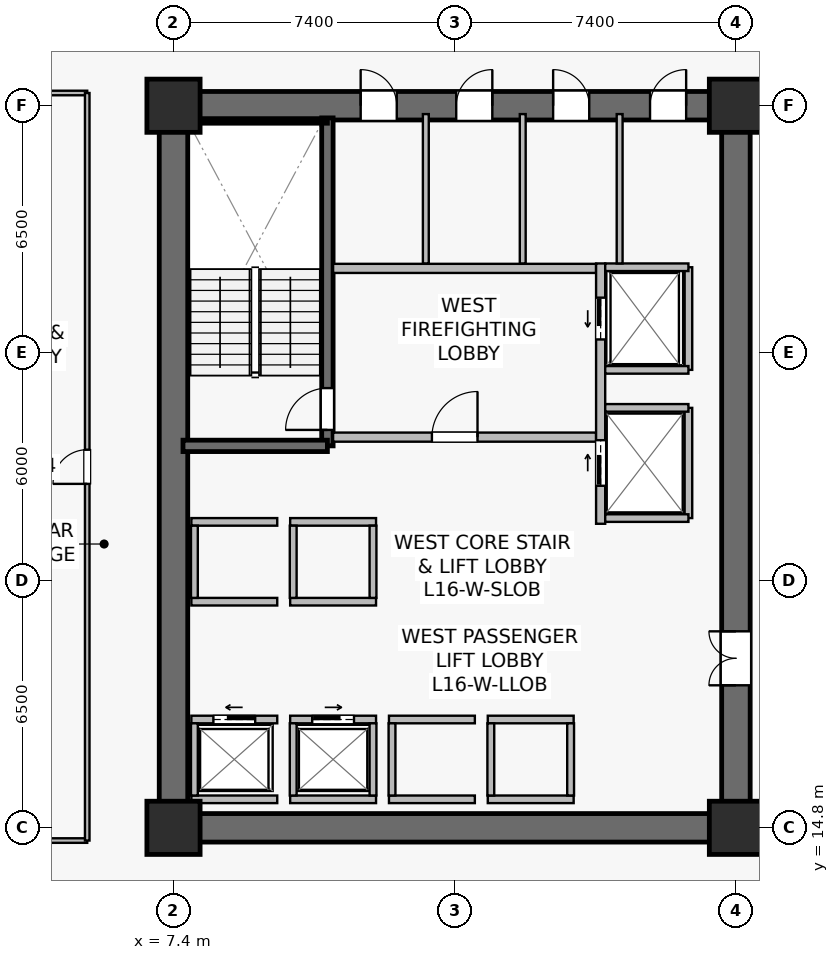
"""IFC4 building model, lengths in metres.
Left out: names, types, materials, properties, quantities, classifications, styles, units other than length and angle.
Written with IfcOpenShell. Run it as: python <this file> out.ifc"""

import sys

from ifc_helpers import new_model, si_unit, direction, frame, frame_2d, origin, origin_2d, place, context, subcontext, project, spatial, rectangle, extrude, source, transform, mapped, element, fill, save


model = new_model("IFC4")
c1 = context("Model", 3, precision=1e-05, world=origin(), true_north=direction((0.0, 1.0)))
c2 = subcontext(c1, "Body", "Model", "MODEL_VIEW")
j1 = project(units=[si_unit("LENGTHUNIT", "METRE"), si_unit("PLANEANGLEUNIT", "RADIAN")], contexts=[c1])
p1 = place(None, origin())
s1 = spatial("IfcSite", under=j1, at=p1, CompositionType="ELEMENT")
p2 = place(p1, origin())
s2 = spatial("IfcBuilding", under=s1, at=p2, CompositionType="ELEMENT")
p3 = place(p2, frame((0.0, 0.0, 66.2)))
s3 = spatial("IfcBuildingStorey", under=s2, at=p3, CompositionType="ELEMENT", Elevation=66.2)
p4 = place(p3, frame((7.025, 14.8, 0.0), z_axis=(0.0, 0.0, 1.0), x_axis=(1.0, 0.0, 0.0)))
e1 = element("IfcWall", 1, at=p4, inside=s3, PredefinedType="SHEAR", context=c2, shape_type="SweptSolid", body=[
    extrude(rectangle(XDim=15.55, YDim=0.75, at=frame_2d((7.775, 0.0))), origin(), (0.0, 0.0, 1.0), 3.78),
])
p5 = place(p3, frame((7.025, 33.8, 0.0), z_axis=(0.0, 0.0, 1.0), x_axis=(1.0, 0.0, 0.0)))
e2 = element("IfcWall", 2, at=p5, inside=s3, PredefinedType="SHEAR", context=c2, shape_type="SweptSolid", body=[
    extrude(rectangle(XDim=15.55, YDim=0.75, at=frame_2d((7.775, 0.0))), origin(), (0.0, 0.0, 1.0), 3.78),
])
p6 = place(p5, frame((5.3, 0.0, 0.0)))
e3 = element("IfcOpeningElement", 3, at=p6, cuts=e2, PredefinedType="OPENING", context=c2, shape_type="SweptSolid", body=[
    extrude(rectangle(XDim=0.95, YDim=2.15, at=frame_2d((0.475, 1.075))), frame((0.0, 0.385, 0.0), z_axis=(0.0, -1.0, 0.0), x_axis=(1.0, 0.0, 0.0)), (0.0, 0.0, 1.0), 0.77),
])
p7 = place(p5, frame((7.815, 0.0, 0.0)))
e4 = element("IfcOpeningElement", 4, at=p7, cuts=e2, PredefinedType="OPENING", context=c2, shape_type="SweptSolid", body=[
    extrude(rectangle(XDim=0.95, YDim=2.15, at=frame_2d((0.475, 1.075))), frame((0.0, 0.385, 0.0), z_axis=(0.0, -1.0, 0.0), x_axis=(1.0, 0.0, 0.0)), (0.0, 0.0, 1.0), 0.77),
])
p8 = place(p5, frame((10.365, 0.0, 0.0)))
e5 = element("IfcOpeningElement", 5, at=p8, cuts=e2, PredefinedType="OPENING", context=c2, shape_type="SweptSolid", body=[
    extrude(rectangle(XDim=0.95, YDim=2.15, at=frame_2d((0.475, 1.075))), frame((0.0, 0.385, 0.0), z_axis=(0.0, -1.0, 0.0), x_axis=(1.0, 0.0, 0.0)), (0.0, 0.0, 1.0), 0.77),
])
p9 = place(p5, frame((12.915, 0.0, 0.0)))
e6 = element("IfcOpeningElement", 6, at=p9, cuts=e2, PredefinedType="OPENING", context=c2, shape_type="SweptSolid", body=[
    extrude(rectangle(XDim=0.95, YDim=2.15, at=frame_2d((0.475, 1.075))), frame((0.0, 0.385, 0.0), z_axis=(0.0, -1.0, 0.0), x_axis=(1.0, 0.0, 0.0)), (0.0, 0.0, 1.0), 0.77),
])
p10 = place(p3, frame((7.4, 15.175, 0.0), z_axis=(0.0, 0.0, 1.0), x_axis=(0.0, 1.0, 0.0)))
e7 = element("IfcWall", 7, at=p10, inside=s3, PredefinedType="SHEAR", context=c2, shape_type="SweptSolid", body=[
    extrude(rectangle(XDim=18.25, YDim=0.75, at=frame_2d((9.125, 0.0))), origin(), (0.0, 0.0, 1.0), 3.78),
])
p11 = place(p3, frame((22.2, 15.175, 0.0), z_axis=(0.0, 0.0, 1.0), x_axis=(0.0, 1.0, 0.0)))
e8 = element("IfcWall", 8, at=p11, inside=s3, PredefinedType="SHEAR", context=c2, shape_type="SweptSolid", body=[
    extrude(rectangle(XDim=18.25, YDim=0.75, at=frame_2d((9.125, 0.0))), origin(), (0.0, 0.0, 1.0), 3.78),
])
p12 = place(p11, frame((3.375, 0.0, 0.0)))
e9 = element("IfcOpeningElement", 9, at=p12, cuts=e8, PredefinedType="OPENING", context=c2, shape_type="SweptSolid", body=[
    extrude(rectangle(XDim=1.42, YDim=2.2, at=frame_2d((0.71, 1.1))), frame((0.0, 0.385, 0.0), z_axis=(0.0, -1.0, 0.0), x_axis=(1.0, 0.0, 0.0)), (0.0, 0.0, 1.0), 0.77),
])
p13 = place(p3, frame((11.45, 24.85, 0.0), z_axis=(0.0, 0.0, 1.0), x_axis=(0.0, 1.0, 0.0)))
e10 = element("IfcWall", 10, at=p13, inside=s3, PredefinedType="SHEAR", context=c2, shape_type="SweptSolid", body=[
    extrude(rectangle(XDim=8.63, YDim=0.3, at=frame_2d((4.315, 0.0))), origin(), (0.0, 0.0, 1.0), 3.78),
])
p14 = place(p13, frame((0.42, 0.0, 0.0)))
e11 = element("IfcOpeningElement", 11, at=p14, cuts=e10, PredefinedType="OPENING", context=c2, shape_type="SweptSolid", body=[
    extrude(rectangle(XDim=1.1, YDim=2.15, at=frame_2d((0.55, 1.075))), frame((0.0, 0.16, 0.0), z_axis=(0.0, -1.0, 0.0), x_axis=(1.0, 0.0, 0.0)), (0.0, 0.0, 1.0), 0.32),
])
p15 = place(p3, frame((7.65, 24.85, 0.0), z_axis=(0.0, 0.0, 1.0), x_axis=(1.0, 0.0, 0.0)))
e12 = element("IfcWall", 12, at=p15, inside=s3, PredefinedType="SHEAR", context=c2, shape_type="SweptSolid", body=[
    extrude(rectangle(XDim=3.8, YDim=0.3, at=frame_2d((1.9, 0.0))), origin(), (0.0, 0.0, 1.0), 3.78),
])
p16 = place(p3, frame((7.73, 33.4, 0.0), z_axis=(0.0, 0.0, 1.0), x_axis=(1.0, 0.0, 0.0)))
e13 = element("IfcWall", 13, at=p16, inside=s3, PredefinedType="SOLIDWALL", context=c2, shape_type="SweptSolid", body=[
    extrude(rectangle(XDim=3.72, YDim=0.12, at=frame_2d((1.86, 0.0))), origin(), (0.0, 0.0, 1.0), 3.78),
])
m1 = source(origin(), c2, "Body", "SweptSolid", [
    extrude(rectangle(XDim=1.4, YDim=1.4, at=origin_2d()), origin(), (0.0, 0.0, 1.0), 4.1),
])
for number, where, z_axis, x_axis in (
    (14, (7.4, 14.8, 0.0), (0.0, 0.0, 1.0), (1.0, 0.0, 0.0)),
    (15, (22.2, 14.8, 0.0), (0.0, 0.0, 1.0), (1.0, 0.0, 0.0)),
    (16, (7.4, 33.8, 0.0), (0.0, 0.0, 1.0), (1.0, 0.0, 0.0)),
    (17, (22.2, 33.8, 0.0), (0.0, 0.0, 1.0), (1.0, 0.0, 0.0)),
):
    element("IfcColumn", number, at=place(p3, frame(where, z_axis=z_axis, x_axis=x_axis)), inside=s3, PredefinedType="COLUMN", context=c2, shape_type="MappedRepresentation", body=[
        mapped(m1, transform((0.0, 0.0, 0.0), scale=1.0)),
    ])
p17 = place(p3, frame((11.6, 25.08, 0.0), z_axis=(0.0, 0.0, 1.0), x_axis=(1.0, 0.0, 0.0)))
e18 = element("IfcWall", 18, at=p17, inside=s3, PredefinedType="SOLIDWALL", context=c2, shape_type="SweptSolid", body=[
    extrude(rectangle(XDim=6.92, YDim=0.24, at=frame_2d((3.46, 0.0))), origin(), (0.0, 0.0, 1.0), 3.115),
])
p18 = place(p17, frame((2.6, 0.0, 0.0)))
e19 = element("IfcOpeningElement", 19, at=p18, cuts=e18, PredefinedType="OPENING", context=c2, shape_type="SweptSolid", body=[
    extrude(rectangle(XDim=1.2, YDim=2.16, at=frame_2d((0.6, 1.08))), frame((0.0, 0.13, 0.0), z_axis=(0.0, -1.0, 0.0), x_axis=(1.0, 0.0, 0.0)), (0.0, 0.0, 1.0), 0.26),
])
p19 = place(p3, frame((11.6, 29.52, 0.0), z_axis=(0.0, 0.0, 1.0), x_axis=(1.0, 0.0, 0.0)))
e20 = element("IfcWall", 20, at=p19, inside=s3, PredefinedType="SOLIDWALL", context=c2, shape_type="SweptSolid", body=[
    extrude(rectangle(XDim=6.92, YDim=0.24, at=frame_2d((3.46, 0.0))), origin(), (0.0, 0.0, 1.0), 3.115),
])
p20 = place(p3, frame((18.64, 22.8, 0.0), z_axis=(0.0, 0.0, 1.0), x_axis=(0.0, 1.0, 0.0)))
e21 = element("IfcWall", 21, at=p20, inside=s3, PredefinedType="SOLIDWALL", context=c2, shape_type="SweptSolid", body=[
    extrude(rectangle(XDim=6.85, YDim=0.24, at=frame_2d((3.425, 0.0))), origin(), (0.0, 0.0, 1.0), 2.865),
])
p21 = place(p20, frame((4.85, 0.0, 0.0)))
e22 = element("IfcOpeningElement", 22, at=p21, cuts=e21, PredefinedType="OPENING", context=c2, shape_type="SweptSolid", body=[
    extrude(rectangle(XDim=1.1, YDim=2.22, at=frame_2d((0.55, 1.11))), frame((0.0, 0.13, 0.0), z_axis=(0.0, -1.0, 0.0), x_axis=(1.0, 0.0, 0.0)), (0.0, 0.0, 1.0), 0.26),
])
p22 = place(p20, frame((1.0, 0.0, 0.0)))
e23 = element("IfcOpeningElement", 23, at=p22, cuts=e21, PredefinedType="OPENING", context=c2, shape_type="SweptSolid", body=[
    extrude(rectangle(XDim=1.2, YDim=2.22, at=frame_2d((0.6, 1.11))), frame((0.0, 0.13, 0.0), z_axis=(0.0, -1.0, 0.0), x_axis=(1.0, 0.0, 0.0)), (0.0, 0.0, 1.0), 0.26),
])
p23 = place(p3, frame((7.87, 17.65, 0.0), z_axis=(0.0, 0.0, 1.0), x_axis=(1.0, 0.0, 0.0)))
e24 = element("IfcWall", 24, at=p23, inside=s3, PredefinedType="SOLIDWALL", context=c2, shape_type="SweptSolid", body=[
    extrude(rectangle(XDim=2.26, YDim=0.2, at=frame_2d((1.13, 0.0))), origin(), (0.0, 0.0, 1.0), 3.78),
])
p24 = place(p23, frame((0.58, 0.0, 0.0)))
e25 = element("IfcOpeningElement", 25, at=p24, cuts=e24, PredefinedType="OPENING", context=c2, shape_type="SweptSolid", body=[
    extrude(rectangle(XDim=1.1, YDim=2.22, at=frame_2d((0.55, 1.11))), frame((0.0, 0.11, 0.0), z_axis=(0.0, -1.0, 0.0), x_axis=(1.0, 0.0, 0.0)), (0.0, 0.0, 1.0), 0.22),
])
p25 = place(p3, frame((7.87, 15.55, 0.0), z_axis=(0.0, 0.0, 1.0), x_axis=(1.0, 0.0, 0.0)))
e26 = element("IfcWall", 26, at=p25, inside=s3, PredefinedType="SOLIDWALL", context=c2, shape_type="SweptSolid", body=[
    extrude(rectangle(XDim=2.26, YDim=0.2, at=frame_2d((1.13, 0.0))), origin(), (0.0, 0.0, 1.0), 3.78),
])
p26 = place(p3, frame((7.95, 15.65, 0.0), z_axis=(0.0, 0.0, 1.0), x_axis=(0.0, 1.0, 0.0)))
e27 = element("IfcWall", 27, at=p26, inside=s3, PredefinedType="SOLIDWALL", context=c2, shape_type="SweptSolid", body=[
    extrude(rectangle(XDim=1.9, YDim=0.18, at=frame_2d((0.95, 0.0))), origin(), (0.0, 0.0, 1.0), 3.78),
])
p27 = place(p3, frame((10.47, 17.65, 0.0), z_axis=(0.0, 0.0, 1.0), x_axis=(1.0, 0.0, 0.0)))
e28 = element("IfcWall", 28, at=p27, inside=s3, PredefinedType="SOLIDWALL", context=c2, shape_type="SweptSolid", body=[
    extrude(rectangle(XDim=2.26, YDim=0.2, at=frame_2d((1.13, 0.0))), origin(), (0.0, 0.0, 1.0), 3.78),
])
p28 = place(p27, frame((0.58, 0.0, 0.0)))
e29 = element("IfcOpeningElement", 29, at=p28, cuts=e28, PredefinedType="OPENING", context=c2, shape_type="SweptSolid", body=[
    extrude(rectangle(XDim=1.1, YDim=2.22, at=frame_2d((0.55, 1.11))), frame((0.0, 0.11, 0.0), z_axis=(0.0, -1.0, 0.0), x_axis=(1.0, 0.0, 0.0)), (0.0, 0.0, 1.0), 0.22),
])
p29 = place(p3, frame((10.47, 15.55, 0.0), z_axis=(0.0, 0.0, 1.0), x_axis=(1.0, 0.0, 0.0)))
e30 = element("IfcWall", 30, at=p29, inside=s3, PredefinedType="SOLIDWALL", context=c2, shape_type="SweptSolid", body=[
    extrude(rectangle(XDim=2.26, YDim=0.2, at=frame_2d((1.13, 0.0))), origin(), (0.0, 0.0, 1.0), 3.78),
])
for number, where, z_axis, x_axis in (
    (31, (10.55, 15.65, 0.0), (0.0, 0.0, 1.0), (0.0, 1.0, 0.0)),
    (32, (12.65, 15.65, 0.0), (0.0, 0.0, 1.0), (0.0, 1.0, 0.0)),
):
    element("IfcWall", number, at=place(p3, frame(where, z_axis=z_axis, x_axis=x_axis)), inside=s3, PredefinedType="SOLIDWALL", context=c2, shape_type="SweptSolid", body=[
        extrude(rectangle(XDim=1.9, YDim=0.18, at=frame_2d((0.95, 0.0))), origin(), (0.0, 0.0, 1.0), 3.78),
    ])
for number, where, z_axis, x_axis in (
    (33, (13.07, 17.65, 0.0), (0.0, 0.0, 1.0), (1.0, 0.0, 0.0)),
    (34, (13.07, 15.55, 0.0), (0.0, 0.0, 1.0), (1.0, 0.0, 0.0)),
):
    element("IfcWall", number, at=place(p3, frame(where, z_axis=z_axis, x_axis=x_axis)), inside=s3, PredefinedType="SOLIDWALL", context=c2, shape_type="SweptSolid", body=[
        extrude(rectangle(XDim=2.26, YDim=0.2, at=frame_2d((1.13, 0.0))), origin(), (0.0, 0.0, 1.0), 3.115),
    ])
p30 = place(p3, frame((13.15, 15.65, 0.0), z_axis=(0.0, 0.0, 1.0), x_axis=(0.0, 1.0, 0.0)))
e35 = element("IfcWall", 35, at=p30, inside=s3, PredefinedType="SOLIDWALL", context=c2, shape_type="SweptSolid", body=[
    extrude(rectangle(XDim=1.9, YDim=0.18, at=frame_2d((0.95, 0.0))), origin(), (0.0, 0.0, 1.0), 3.78),
])
for number, where, z_axis, x_axis in (
    (36, (15.67, 17.65, 0.0), (0.0, 0.0, 1.0), (1.0, 0.0, 0.0)),
    (37, (15.67, 15.55, 0.0), (0.0, 0.0, 1.0), (1.0, 0.0, 0.0)),
):
    element("IfcWall", number, at=place(p3, frame(where, z_axis=z_axis, x_axis=x_axis)), inside=s3, PredefinedType="SOLIDWALL", context=c2, shape_type="SweptSolid", body=[
        extrude(rectangle(XDim=2.26, YDim=0.2, at=frame_2d((1.13, 0.0))), origin(), (0.0, 0.0, 1.0), 3.78),
    ])
for number, where, z_axis, x_axis in (
    (38, (15.75, 15.65, 0.0), (0.0, 0.0, 1.0), (0.0, 1.0, 0.0)),
    (39, (17.85, 15.65, 0.0), (0.0, 0.0, 1.0), (0.0, 1.0, 0.0)),
):
    element("IfcWall", number, at=place(p3, frame(where, z_axis=z_axis, x_axis=x_axis)), inside=s3, PredefinedType="SOLIDWALL", context=c2, shape_type="SweptSolid", body=[
        extrude(rectangle(XDim=1.9, YDim=0.18, at=frame_2d((0.95, 0.0))), origin(), (0.0, 0.0, 1.0), 3.78),
    ])
for number, where, z_axis, x_axis in (
    (40, (7.87, 20.75, 0.0), (0.0, 0.0, 1.0), (1.0, 0.0, 0.0)),
    (41, (7.87, 22.85, 0.0), (0.0, 0.0, 1.0), (1.0, 0.0, 0.0)),
):
    element("IfcWall", number, at=place(p3, frame(where, z_axis=z_axis, x_axis=x_axis)), inside=s3, PredefinedType="SOLIDWALL", context=c2, shape_type="SweptSolid", body=[
        extrude(rectangle(XDim=2.26, YDim=0.2, at=frame_2d((1.13, 0.0))), origin(), (0.0, 0.0, 1.0), 3.78),
    ])
p31 = place(p3, frame((7.95, 20.85, 0.0), z_axis=(0.0, 0.0, 1.0), x_axis=(0.0, 1.0, 0.0)))
e42 = element("IfcWall", 42, at=p31, inside=s3, PredefinedType="SOLIDWALL", context=c2, shape_type="SweptSolid", body=[
    extrude(rectangle(XDim=1.9, YDim=0.18, at=frame_2d((0.95, 0.0))), origin(), (0.0, 0.0, 1.0), 3.78),
])
for number, where, z_axis, x_axis in (
    (43, (10.47, 20.75, 0.0), (0.0, 0.0, 1.0), (1.0, 0.0, 0.0)),
    (44, (10.47, 22.85, 0.0), (0.0, 0.0, 1.0), (1.0, 0.0, 0.0)),
):
    element("IfcWall", number, at=place(p3, frame(where, z_axis=z_axis, x_axis=x_axis)), inside=s3, PredefinedType="SOLIDWALL", context=c2, shape_type="SweptSolid", body=[
        extrude(rectangle(XDim=2.26, YDim=0.2, at=frame_2d((1.13, 0.0))), origin(), (0.0, 0.0, 1.0), 3.78),
    ])
for number, where, z_axis, x_axis in (
    (45, (10.55, 20.85, 0.0), (0.0, 0.0, 1.0), (0.0, 1.0, 0.0)),
    (46, (12.65, 20.85, 0.0), (0.0, 0.0, 1.0), (0.0, 1.0, 0.0)),
):
    element("IfcWall", number, at=place(p3, frame(where, z_axis=z_axis, x_axis=x_axis)), inside=s3, PredefinedType="SOLIDWALL", context=c2, shape_type="SweptSolid", body=[
        extrude(rectangle(XDim=1.9, YDim=0.18, at=frame_2d((0.95, 0.0))), origin(), (0.0, 0.0, 1.0), 3.78),
    ])
p32 = place(p3, frame((20.95, 26.85, 0.0), z_axis=(0.0, 0.0, 1.0), x_axis=(0.0, 1.0, 0.0)))
e47 = element("IfcWall", 47, at=p32, inside=s3, PredefinedType="SOLIDWALL", context=c2, shape_type="SweptSolid", body=[
    extrude(rectangle(XDim=2.7, YDim=0.2, at=frame_2d((1.35, 0.0))), origin(), (0.0, 0.0, 1.0), 3.78),
])
p33 = place(p3, frame((18.76, 29.55, 0.0), z_axis=(0.0, 0.0, 1.0), x_axis=(1.0, 0.0, 0.0)))
e48 = element("IfcWall", 48, at=p33, inside=s3, PredefinedType="SOLIDWALL", context=c2, shape_type="SweptSolid", body=[
    extrude(rectangle(XDim=2.19, YDim=0.2, at=frame_2d((1.095, 0.0))), origin(), (0.0, 0.0, 1.0), 3.78),
])
p34 = place(p3, frame((18.76, 26.85, 0.0), z_axis=(0.0, 0.0, 1.0), x_axis=(1.0, 0.0, 0.0)))
e49 = element("IfcWall", 49, at=p34, inside=s3, PredefinedType="SOLIDWALL", context=c2, shape_type="SweptSolid", body=[
    extrude(rectangle(XDim=2.19, YDim=0.2, at=frame_2d((1.095, 0.0))), origin(), (0.0, 0.0, 1.0), 3.177),
])
p35 = place(p3, frame((20.95, 22.95, 0.0), z_axis=(0.0, 0.0, 1.0), x_axis=(0.0, 1.0, 0.0)))
e50 = element("IfcWall", 50, at=p35, inside=s3, PredefinedType="SOLIDWALL", context=c2, shape_type="SweptSolid", body=[
    extrude(rectangle(XDim=2.9, YDim=0.2, at=frame_2d((1.45, 0.0))), origin(), (0.0, 0.0, 1.0), 2.865),
])
for number, where, z_axis, x_axis in (
    (51, (18.76, 25.85, 0.0), (0.0, 0.0, 1.0), (1.0, 0.0, 0.0)),
    (52, (18.76, 22.95, 0.0), (0.0, 0.0, 1.0), (1.0, 0.0, 0.0)),
):
    element("IfcWall", number, at=place(p3, frame(where, z_axis=z_axis, x_axis=x_axis)), inside=s3, PredefinedType="SOLIDWALL", context=c2, shape_type="SweptSolid", body=[
        extrude(rectangle(XDim=2.19, YDim=0.2, at=frame_2d((1.095, 0.0))), origin(), (0.0, 0.0, 1.0), 3.78),
    ])
for number, where, z_axis, x_axis in (
    (53, (14.04, 29.65, 0.0), (0.0, 0.0, 1.0), (0.0, 1.0, 0.0)),
    (54, (16.59, 29.65, 0.0), (0.0, 0.0, 1.0), (0.0, 1.0, 0.0)),
    (55, (19.14, 29.65, 0.0), (0.0, 0.0, 1.0), (0.0, 1.0, 0.0)),
):
    element("IfcWall", number, at=place(p3, frame(where, z_axis=z_axis, x_axis=x_axis)), inside=s3, PredefinedType="PLUMBINGWALL", context=c2, shape_type="SweptSolid", body=[
        extrude(rectangle(XDim=3.93, YDim=0.155, at=frame_2d((1.965, 0.0))), origin(), (0.0, 0.0, 1.0), 3.78),
    ])
for number, where, z_axis, x_axis in (
    (56, (0.11, 14.465, 0.0), (0.0, 0.0, 1.0), (1.0, 0.0, 0.0)),
    (57, (0.11, 34.135, 0.0), (0.0, 0.0, 1.0), (1.0, 0.0, 0.0)),
):
    element("IfcWall", number, at=place(p3, frame(where, z_axis=z_axis, x_axis=x_axis)), inside=s3, PredefinedType="PARTITIONING", context=c2, shape_type="SweptSolid", body=[
        extrude(rectangle(XDim=5.02, YDim=0.12, at=frame_2d((2.51, 0.0))), origin(), (0.0, 0.0, 1.0), 3.78),
    ])
p36 = place(p3, frame((5.13, 14.465, 0.0), z_axis=(0.0, 0.0, 1.0), x_axis=(0.0, 1.0, 0.0)))
e58 = element("IfcWall", 58, at=p36, inside=s3, PredefinedType="PARTITIONING", context=c2, shape_type="SweptSolid", body=[
    extrude(rectangle(XDim=19.67, YDim=0.12, at=frame_2d((9.835, 0.0))), origin(), (0.0, 0.0, 1.0), 3.78),
])
p37 = place(p36, frame((9.385, 0.0, 0.0)))
e59 = element("IfcOpeningElement", 59, at=p37, cuts=e58, PredefinedType="OPENING", context=c2, shape_type="SweptSolid", body=[
    extrude(rectangle(XDim=0.9, YDim=2.1, at=frame_2d((0.45, 1.05))), frame((0.0, 0.07, 0.0), z_axis=(0.0, -1.0, 0.0), x_axis=(1.0, 0.0, 0.0)), (0.0, 0.0, 1.0), 0.14),
])
m2 = source(origin(), c2, "Body", "SweptSolid", [
    extrude(rectangle(XDim=1.1, YDim=2.15, at=frame_2d((0.55, 1.075))), frame((0.0, 0.025, 0.0), z_axis=(0.0, -1.0, 0.0), x_axis=(1.0, 0.0, 0.0)), (0.0, 0.0, 1.0), 0.05),
])
p38 = place(p14, origin())
e60 = element("IfcDoor", 60, at=p38, inside=s3, OperationType="SINGLE_SWING_LEFT", PredefinedType="DOOR", context=c2, shape_type="MappedRepresentation", body=[
    mapped(m2, transform((0.0, 0.0, 0.0), scale=1.0)),
])
fill(e11, e60)
m3 = source(origin(), c2, "Body", "SweptSolid", [
    extrude(rectangle(XDim=1.2, YDim=2.16, at=frame_2d((0.6, 1.08))), frame((0.0, 0.025, 0.0), z_axis=(0.0, -1.0, 0.0), x_axis=(1.0, 0.0, 0.0)), (0.0, 0.0, 1.0), 0.05),
])
p39 = place(p18, origin())
e61 = element("IfcDoor", 61, at=p39, inside=s3, OperationType="SINGLE_SWING_RIGHT", PredefinedType="DOOR", context=c2, shape_type="MappedRepresentation", body=[
    mapped(m3, transform((0.0, 0.0, 0.0), scale=1.0)),
])
fill(e19, e61)
m4 = source(origin(), c2, "Body", "SweptSolid", [
    extrude(rectangle(XDim=1.1, YDim=2.22, at=frame_2d((0.55, 1.11))), frame((0.0, 0.025, 0.0), z_axis=(0.0, -1.0, 0.0), x_axis=(1.0, 0.0, 0.0)), (0.0, 0.0, 1.0), 0.05),
])
p40 = place(p24, origin())
e62 = element("IfcDoor", 62, at=p40, inside=s3, OperationType="SLIDING_TO_LEFT", PredefinedType="USERDEFINED", context=c2, shape_type="MappedRepresentation", body=[
    mapped(m4, transform((0.0, 0.0, 0.0), scale=1.0)),
])
fill(e25, e62)
p41 = place(p28, origin())
e63 = element("IfcDoor", 63, at=p41, inside=s3, OperationType="SLIDING_TO_RIGHT", PredefinedType="USERDEFINED", context=c2, shape_type="MappedRepresentation", body=[
    mapped(m4, transform((0.0, 0.0, 0.0), scale=1.0)),
])
fill(e29, e63)
p42 = place(p21, origin())
e64 = element("IfcDoor", 64, at=p42, inside=s3, OperationType="SLIDING_TO_LEFT", PredefinedType="USERDEFINED", context=c2, shape_type="MappedRepresentation", body=[
    mapped(m4, transform((0.0, 0.0, 0.0), scale=1.0)),
])
fill(e22, e64)
m5 = source(origin(), c2, "Body", "SweptSolid", [
    extrude(rectangle(XDim=1.2, YDim=2.22, at=frame_2d((0.6, 1.11))), frame((0.0, 0.025, 0.0), z_axis=(0.0, -1.0, 0.0), x_axis=(1.0, 0.0, 0.0)), (0.0, 0.0, 1.0), 0.05),
])
p43 = place(p22, origin())
e65 = element("IfcDoor", 65, at=p43, inside=s3, OperationType="SLIDING_TO_RIGHT", PredefinedType="USERDEFINED", context=c2, shape_type="MappedRepresentation", body=[
    mapped(m5, transform((0.0, 0.0, 0.0), scale=1.0)),
])
fill(e23, e65)
m6 = source(origin(), c2, "Body", "SweptSolid", [
    extrude(rectangle(XDim=1.42, YDim=2.2, at=frame_2d((0.71, 1.1))), frame((0.0, 0.025, 0.0), z_axis=(0.0, -1.0, 0.0), x_axis=(1.0, 0.0, 0.0)), (0.0, 0.0, 1.0), 0.05),
])
p44 = place(p12, origin())
e66 = element("IfcDoor", 66, at=p44, inside=s3, OperationType="DOUBLE_DOOR_SINGLE_SWING", PredefinedType="DOOR", context=c2, shape_type="MappedRepresentation", body=[
    mapped(m6, transform((0.0, 0.0, 0.0), scale=1.0)),
])
fill(e9, e66)
m7 = source(origin(), c2, "Body", "SweptSolid", [
    extrude(rectangle(XDim=0.95, YDim=2.15, at=frame_2d((0.475, 1.075))), frame((0.0, 0.025, 0.0), z_axis=(0.0, -1.0, 0.0), x_axis=(1.0, 0.0, 0.0)), (0.0, 0.0, 1.0), 0.05),
])
p45 = place(p6, origin())
e67 = element("IfcDoor", 67, at=p45, inside=s3, OperationType="SINGLE_SWING_LEFT", PredefinedType="DOOR", context=c2, shape_type="MappedRepresentation", body=[
    mapped(m7, transform((0.0, 0.0, 0.0), scale=1.0)),
])
fill(e3, e67)
p46 = place(p7, origin())
e68 = element("IfcDoor", 68, at=p46, inside=s3, OperationType="SINGLE_SWING_RIGHT", PredefinedType="DOOR", context=c2, shape_type="MappedRepresentation", body=[
    mapped(m7, transform((0.0, 0.0, 0.0), scale=1.0)),
])
fill(e4, e68)
p47 = place(p8, origin())
e69 = element("IfcDoor", 69, at=p47, inside=s3, OperationType="SINGLE_SWING_LEFT", PredefinedType="DOOR", context=c2, shape_type="MappedRepresentation", body=[
    mapped(m7, transform((0.0, 0.0, 0.0), scale=1.0)),
])
fill(e5, e69)
p48 = place(p9, origin())
e70 = element("IfcDoor", 70, at=p48, inside=s3, OperationType="SINGLE_SWING_RIGHT", PredefinedType="DOOR", context=c2, shape_type="MappedRepresentation", body=[
    mapped(m7, transform((0.0, 0.0, 0.0), scale=1.0)),
])
fill(e6, e70)
m8 = source(origin(), c2, "Body", "SweptSolid", [
    extrude(rectangle(XDim=0.9, YDim=2.1, at=frame_2d((0.45, 1.05))), frame((0.0, 0.025, 0.0), z_axis=(0.0, -1.0, 0.0), x_axis=(1.0, 0.0, 0.0)), (0.0, 0.0, 1.0), 0.05),
])
p49 = place(p37, origin())
e71 = element("IfcDoor", 71, at=p49, inside=s3, OperationType="SINGLE_SWING_LEFT", PredefinedType="DOOR", context=c2, shape_type="MappedRepresentation", body=[
    mapped(m8, transform((0.0, 0.0, 0.0), scale=1.0)),
])
fill(e59, e71)
save(model, sys.argv[1])
